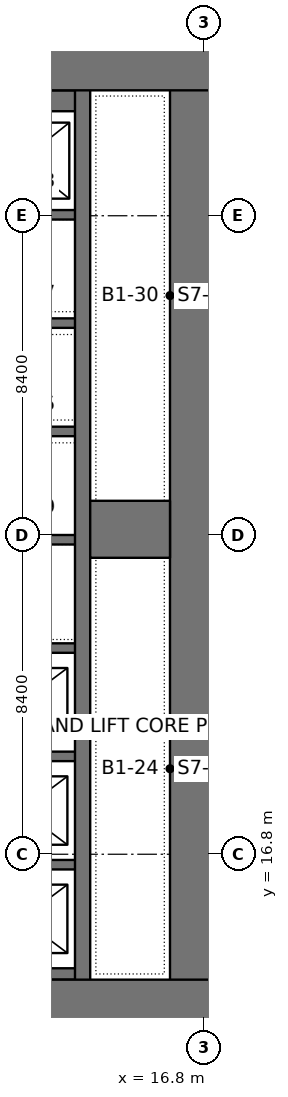
"""IFC4 building model, lengths in metres.
Left out: names, types, materials, properties, quantities, classifications, styles, units other than length and angle.
Written with IfcOpenShell. Run it as: python <this file> out.ifc"""

import sys

from ifc_helpers import new_model, si_unit, direction, frame, frame_2d, origin, place, context, subcontext, project, spatial, rectangle, extrude, element, save


model = new_model("IFC4")
c1 = context("Model", 3, precision=1e-05, world=origin(), true_north=direction((0.0, 1.0)))
c2 = subcontext(c1, "Body", "Model", "MODEL_VIEW")
j1 = project(units=[si_unit("LENGTHUNIT", "METRE"), si_unit("PLANEANGLEUNIT", "RADIAN")], contexts=[c1])
p1 = place(None, origin())
s1 = spatial("IfcSite", under=j1, at=p1, CompositionType="ELEMENT")
p2 = place(p1, origin())
s2 = spatial("IfcBuilding", under=s1, at=p2, CompositionType="ELEMENT")
p3 = place(p2, frame((0.0, 0.0, -4.2)))
s3 = spatial("IfcBuildingStorey", under=s2, at=p3, CompositionType="ELEMENT", Elevation=-4.2)
p4 = place(p3, frame((-1.8, 12.75, 0.0), z_axis=(0.0, 0.0, 1.0), x_axis=(1.0, 0.0, 0.0)))
e1 = element("IfcWall", 1, at=p4, inside=s3, PredefinedType="SHEAR", context=c2, shape_type="SweptSolid", body=[
    extrude(rectangle(XDim=19.2, YDim=1.5, at=frame_2d((9.6, 0.0))), origin(), (0.0, 0.0, 1.0), 4.2),
])
p5 = place(p4, frame((9.55, 0.0, 0.0)))
e2 = element("IfcOpeningElement", 2, at=p5, cuts=e1, PredefinedType="OPENING", context=c2, shape_type="SweptSolid", body=[
    extrude(rectangle(XDim=1.8, YDim=2.4, at=frame_2d((0.9, 1.2))), frame((0.0, 0.76, 0.0), z_axis=(0.0, -1.0, 0.0), x_axis=(1.0, 0.0, 0.0)), (0.0, 0.0, 1.0), 1.52),
])
p6 = place(p3, frame((-1.8, 37.65, 0.0), z_axis=(0.0, 0.0, 1.0), x_axis=(1.0, 0.0, 0.0)))
e3 = element("IfcWall", 3, at=p6, inside=s3, PredefinedType="SHEAR", context=c2, shape_type="SweptSolid", body=[
    extrude(rectangle(XDim=19.2, YDim=1.5, at=frame_2d((9.6, 0.0))), origin(), (0.0, 0.0, 1.0), 4.2),
])
p7 = place(p6, frame((9.55, 0.0, 0.0)))
e4 = element("IfcOpeningElement", 4, at=p7, cuts=e3, PredefinedType="OPENING", context=c2, shape_type="SweptSolid", body=[
    extrude(rectangle(XDim=1.8, YDim=2.4, at=frame_2d((0.9, 1.2))), frame((0.0, 0.76, 0.0), z_axis=(0.0, -1.0, 0.0), x_axis=(1.0, 0.0, 0.0)), (0.0, 0.0, 1.0), 1.52),
])
p8 = place(p3, frame((16.65, 12.75, 0.0), z_axis=(0.0, 0.0, 1.0), x_axis=(0.0, 1.0, 0.0)))
e5 = element("IfcWall", 5, at=p8, inside=s3, PredefinedType="SHEAR", context=c2, shape_type="SweptSolid", body=[
    extrude(rectangle(XDim=24.9, YDim=1.5, at=frame_2d((12.45, 0.0))), origin(), (0.0, 0.0, 1.0), 4.2),
])
p9 = place(p3, frame((13.6, 13.05, 0.0), z_axis=(0.0, 0.0, 1.0), x_axis=(0.0, 1.0, 0.0)))
e6 = element("IfcWall", 6, at=p9, inside=s3, PredefinedType="SHEAR", context=c2, shape_type="SweptSolid", body=[
    extrude(rectangle(XDim=24.3, YDim=0.4, at=frame_2d((12.15, 0.0))), origin(), (0.0, 0.0, 1.0), 4.2),
])
p10 = place(p3, frame((13.8, 25.35, 0.0), z_axis=(0.0, 0.0, 1.0), x_axis=(1.0, 0.0, 0.0)))
e7 = element("IfcWall", 7, at=p10, inside=s3, PredefinedType="SHEAR", context=c2, shape_type="SweptSolid", body=[
    extrude(rectangle(XDim=2.1, YDim=1.5, at=frame_2d((1.05, 0.0))), origin(), (0.0, 0.0, 1.0), 4.2),
])
p11 = place(p3, frame((10.4, 13.65, 0.0), z_axis=(0.0, 0.0, 1.0), x_axis=(1.0, 0.0, 0.0)))
e8 = element("IfcWall", 8, at=p11, inside=s3, PredefinedType="SHEAR", context=c2, shape_type="SweptSolid", body=[
    extrude(rectangle(XDim=3.2, YDim=0.3, at=frame_2d((1.6, 0.0))), origin(), (0.0, 0.0, 1.0), 4.2),
])
for number, where, z_axis, x_axis in (
    (9, (10.4, 16.525, 0.0), (0.0, 0.0, 1.0), (1.0, 0.0, 0.0)),
    (10, (10.4, 19.375, 0.0), (0.0, 0.0, 1.0), (1.0, 0.0, 0.0)),
    (11, (10.4, 22.225, 0.0), (0.0, 0.0, 1.0), (1.0, 0.0, 0.0)),
    (12, (10.4, 25.075, 0.0), (0.0, 0.0, 1.0), (1.0, 0.0, 0.0)),
    (13, (10.4, 27.925, 0.0), (0.0, 0.0, 1.0), (1.0, 0.0, 0.0)),
    (14, (10.4, 30.775, 0.0), (0.0, 0.0, 1.0), (1.0, 0.0, 0.0)),
    (15, (10.4, 33.625, 0.0), (0.0, 0.0, 1.0), (1.0, 0.0, 0.0)),
):
    element("IfcWall", number, at=place(p3, frame(where, z_axis=z_axis, x_axis=x_axis)), inside=s3, PredefinedType="SHEAR", context=c2, shape_type="SweptSolid", body=[
        extrude(rectangle(XDim=3.2, YDim=0.25, at=frame_2d((1.6, 0.0))), origin(), (0.0, 0.0, 1.0), 4.2),
    ])
p12 = place(p3, frame((10.4, 36.625, 0.0), z_axis=(0.0, 0.0, 1.0), x_axis=(1.0, 0.0, 0.0)))
e16 = element("IfcWall", 16, at=p12, inside=s3, PredefinedType="SHEAR", context=c2, shape_type="SweptSolid", body=[
    extrude(rectangle(XDim=3.2, YDim=0.55, at=frame_2d((1.6, 0.0))), origin(), (0.0, 0.0, 1.0), 4.2),
])
p13 = place(p3, frame((16.82, 25.2, 0.0), z_axis=(0.0, 0.0, 1.0), x_axis=(1.0, 0.0, 0.0)))
e17 = element("IfcWall", 17, at=p13, inside=s3, PredefinedType="PARTITIONING", context=c2, shape_type="SweptSolid", body=[
    extrude(rectangle(XDim=16.76, YDim=0.25, at=frame_2d((8.38, 0.0))), origin(), (0.0, 0.0, 1.0), 3.8),
])
p14 = place(p13, frame((3.73, 0.0, 0.0)))
e18 = element("IfcOpeningElement", 18, at=p14, cuts=e17, PredefinedType="OPENING", context=c2, shape_type="SweptSolid", body=[
    extrude(rectangle(XDim=0.9, YDim=2.2, at=frame_2d((0.45, 1.1))), frame((0.0, 0.135, 0.0), z_axis=(0.0, -1.0, 0.0), x_axis=(1.0, 0.0, 0.0)), (0.0, 0.0, 1.0), 0.27),
])
save(model, sys.argv[1])
